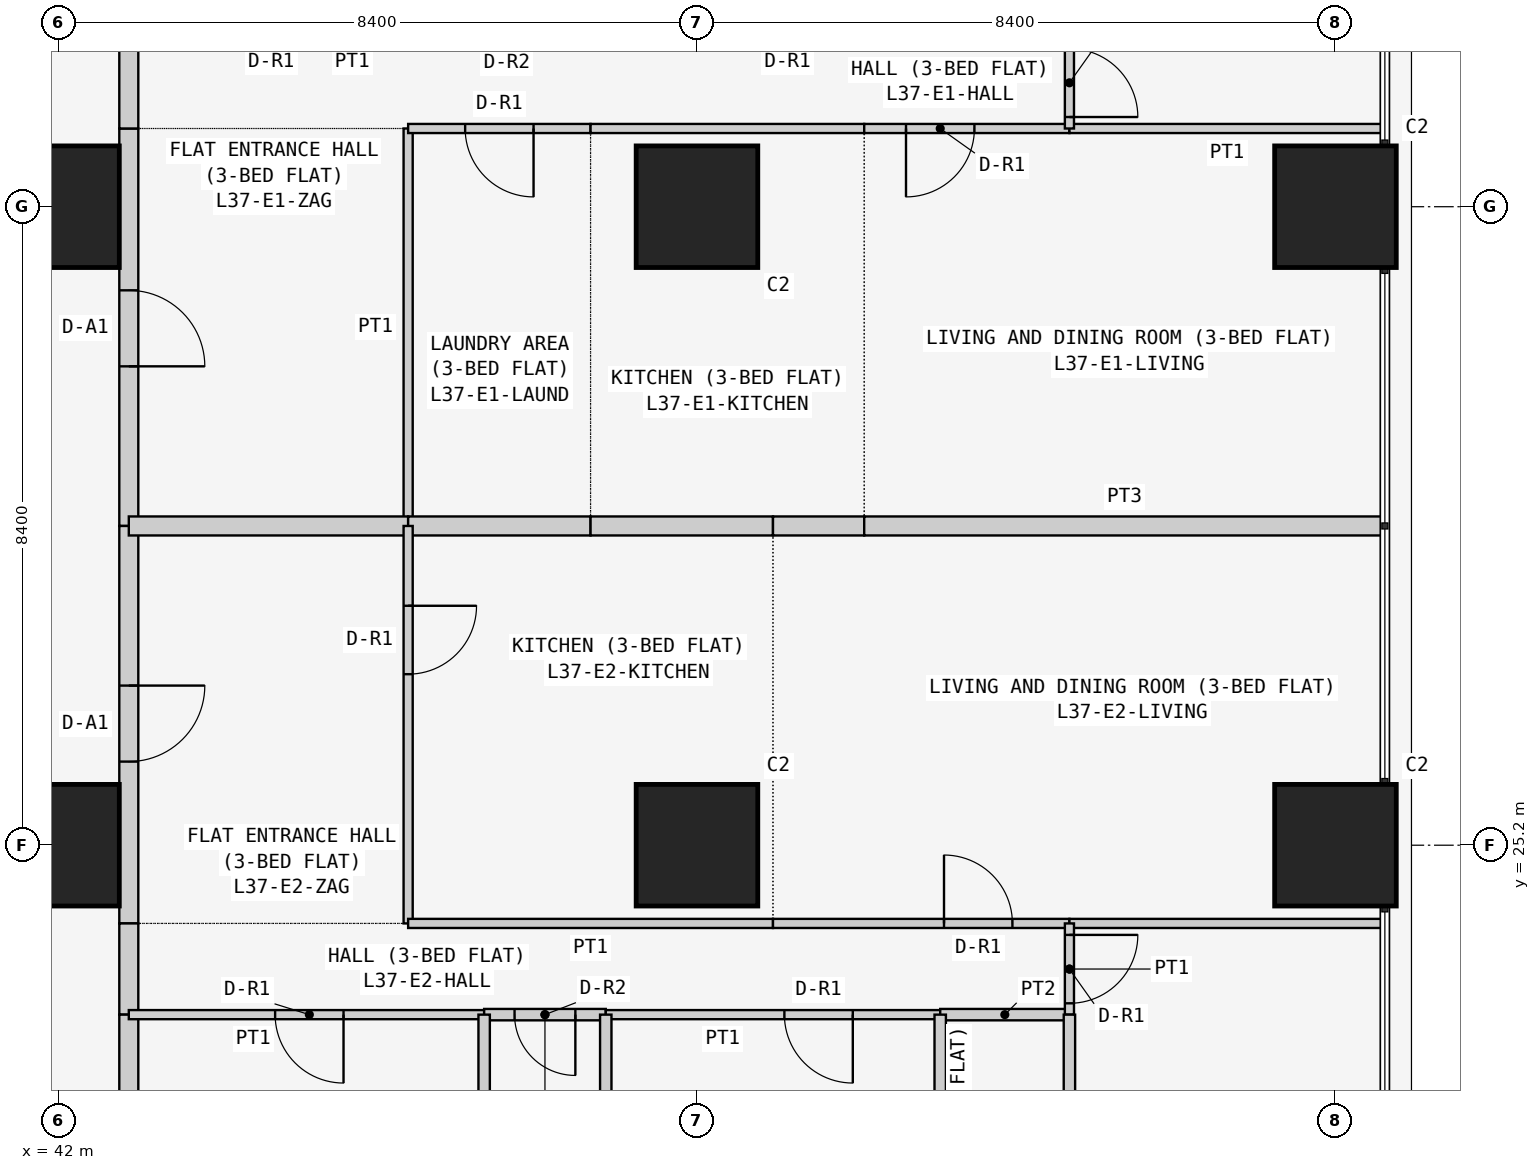
"""IFC4 building model, lengths in metres.
Left out: names, types, materials, properties, quantities, classifications, styles, units other than length and angle.
Written with IfcOpenShell. Run it as: python <this file> out.ifc"""

import sys

from ifc_helpers import new_model, si_unit, direction, frame, frame_2d, origin, origin_2d, place, context, subcontext, project, spatial, rectangle, extrude, element, fill, save


model = new_model("IFC4")
c1 = context("Model", 3, precision=1e-05, world=origin(), true_north=direction((0.0, 1.0)))
c2 = subcontext(c1, "Body", "Model", "MODEL_VIEW")
j1 = project(units=[si_unit("LENGTHUNIT", "METRE"), si_unit("PLANEANGLEUNIT", "RADIAN")], contexts=[c1])
p1 = place(None, origin())
s1 = spatial("IfcSite", under=j1, at=p1, CompositionType="ELEMENT")
p2 = place(p1, origin())
s2 = spatial("IfcBuilding", under=s1, at=p2, CompositionType="ELEMENT")
p3 = place(p2, frame((0.0, 0.0, 144.9)))
s3 = spatial("IfcBuildingStorey", under=s2, at=p3, CompositionType="ELEMENT", Elevation=144.9)
for number, where, z_axis, x_axis in (
    (1, (42.0, 25.2, 0.0), (0.0, 0.0, 1.0), (1.0, 0.0, 0.0)),
    (2, (42.0, 33.6, 0.0), (0.0, 0.0, 1.0), (1.0, 0.0, 0.0)),
    (3, (50.4, 25.2, 0.0), (0.0, 0.0, 1.0), (1.0, 0.0, 0.0)),
    (4, (50.4, 33.6, 0.0), (0.0, 0.0, 1.0), (1.0, 0.0, 0.0)),
    (5, (58.8, 25.2, 0.0), (0.0, 0.0, 1.0), (1.0, 0.0, 0.0)),
    (6, (58.8, 33.6, 0.0), (0.0, 0.0, 1.0), (1.0, 0.0, 0.0)),
):
    element("IfcColumn", number, at=place(p3, frame(where, z_axis=z_axis, x_axis=x_axis)), inside=s3, PredefinedType="COLUMN", context=c2, shape_type="SweptSolid", body=[
        extrude(rectangle(XDim=1.6, YDim=1.6, at=origin_2d()), origin(), (0.0, 0.0, 1.0), 3.6),
    ])
p4 = place(p3, frame((42.925, 34.629, 0.0), z_axis=(0.0, 0.0, 1.0), x_axis=(0.0, -1.0, 0.0)))
e7 = element("IfcWall", 7, at=p4, inside=s3, PredefinedType="PARTITIONING", context=c2, shape_type="SweptSolid", body=[
    extrude(rectangle(XDim=5.229, YDim=0.25, at=frame_2d((2.615, 0.0))), origin(), (0.0, 0.0, 1.0), 3.45),
])
p5 = place(p4, frame((2.129, 0.0, 0.0)))
e8 = element("IfcOpeningElement", 8, at=p5, cuts=e7, PredefinedType="OPENING", context=c2, shape_type="SweptSolid", body=[
    extrude(rectangle(XDim=1.0, YDim=2.1, at=frame_2d((0.5, 1.05))), frame((0.0, 0.135, 0.0), z_axis=(0.0, -1.0, 0.0), x_axis=(1.0, 0.0, 0.0)), (0.0, 0.0, 1.0), 0.27),
])
p6 = place(p3, frame((42.925, 35.829, 0.0), z_axis=(0.0, 0.0, 1.0), x_axis=(0.0, -1.0, 0.0)))
e9 = element("IfcWall", 9, at=p6, inside=s3, PredefinedType="PARTITIONING", context=c2, shape_type="SweptSolid", body=[
    extrude(rectangle(XDim=1.2, YDim=0.25, at=frame_2d((0.6, 0.0))), origin(), (0.0, 0.0, 1.0), 3.45),
])
p7 = place(p3, frame((42.925, 29.4, 0.0), z_axis=(0.0, 0.0, 1.0), x_axis=(0.0, -1.0, 0.0)))
e10 = element("IfcWall", 10, at=p7, inside=s3, PredefinedType="PARTITIONING", context=c2, shape_type="SweptSolid", body=[
    extrude(rectangle(XDim=5.229, YDim=0.25, at=frame_2d((2.615, 0.0))), origin(), (0.0, 0.0, 1.0), 3.45),
])
p8 = place(p7, frame((2.1, 0.0, 0.0)))
e11 = element("IfcOpeningElement", 11, at=p8, cuts=e10, PredefinedType="OPENING", context=c2, shape_type="SweptSolid", body=[
    extrude(rectangle(XDim=1.0, YDim=2.1, at=frame_2d((0.5, 1.05))), frame((0.0, 0.135, 0.0), z_axis=(0.0, -1.0, 0.0), x_axis=(1.0, 0.0, 0.0)), (0.0, 0.0, 1.0), 0.27),
])
p9 = place(p3, frame((42.925, 24.171, 0.0), z_axis=(0.0, 0.0, 1.0), x_axis=(0.0, -1.0, 0.0)))
e12 = element("IfcWall", 12, at=p9, inside=s3, PredefinedType="PARTITIONING", context=c2, shape_type="SweptSolid", body=[
    extrude(rectangle(XDim=1.2, YDim=0.25, at=frame_2d((0.6, 0.0))), origin(), (0.0, 0.0, 1.0), 3.45),
])
p10 = place(p3, frame((42.925, 22.971, 0.0), z_axis=(0.0, 0.0, 1.0), x_axis=(0.0, -1.0, 0.0)))
e13 = element("IfcWall", 13, at=p10, inside=s3, PredefinedType="PARTITIONING", context=c2, shape_type="SweptSolid", body=[
    extrude(rectangle(XDim=6.871, YDim=0.25, at=frame_2d((3.436, 0.0))), origin(), (0.0, 0.0, 1.0), 3.45),
])
p11 = place(p3, frame((46.6, 29.4, 0.0), z_axis=(0.0, 0.0, 1.0), x_axis=(0.0, 1.0, 0.0)))
e14 = element("IfcWall", 14, at=p11, inside=s3, PredefinedType="PARTITIONING", context=c2, shape_type="SweptSolid", body=[
    extrude(rectangle(XDim=5.229, YDim=0.12, at=frame_2d((2.615, 0.0))), origin(), (0.0, 0.0, 1.0), 3.45),
])
p12 = place(p3, frame((42.925, 29.4, 0.0), z_axis=(0.0, 0.0, 1.0), x_axis=(1.0, 0.0, 0.0)))
e15 = element("IfcWall", 15, at=p12, inside=s3, PredefinedType="PARTITIONING", context=c2, shape_type="SweptSolid", body=[
    extrude(rectangle(XDim=3.675, YDim=0.25, at=frame_2d((1.837, 0.0))), origin(), (0.0, 0.0, 1.0), 3.45),
])
p13 = place(p3, frame((49.0, 34.629, 0.0), z_axis=(0.0, 0.0, 1.0), x_axis=(-1.0, 0.0, 0.0)))
e16 = element("IfcWall", 16, at=p13, inside=s3, PredefinedType="PARTITIONING", context=c2, shape_type="SweptSolid", body=[
    extrude(rectangle(XDim=2.4, YDim=0.12, at=frame_2d((1.2, 0.0))), origin(), (0.0, 0.0, 1.0), 3.45),
])
p14 = place(p13, frame((0.75, 0.0, 0.0)))
e17 = element("IfcOpeningElement", 17, at=p14, cuts=e16, PredefinedType="OPENING", context=c2, shape_type="SweptSolid", body=[
    extrude(rectangle(XDim=0.9, YDim=2.1, at=frame_2d((0.45, 1.05))), frame((0.0, 0.07, 0.0), z_axis=(0.0, -1.0, 0.0), x_axis=(1.0, 0.0, 0.0)), (0.0, 0.0, 1.0), 0.14),
])
p15 = place(p3, frame((46.6, 29.4, 0.0), z_axis=(0.0, 0.0, 1.0), x_axis=(1.0, 0.0, 0.0)))
e18 = element("IfcWall", 18, at=p15, inside=s3, PredefinedType="PARTITIONING", context=c2, shape_type="SweptSolid", body=[
    extrude(rectangle(XDim=2.4, YDim=0.25, at=frame_2d((1.2, 0.0))), origin(), (0.0, 0.0, 1.0), 3.45),
])
p16 = place(p3, frame((52.6, 34.629, 0.0), z_axis=(0.0, 0.0, 1.0), x_axis=(-1.0, 0.0, 0.0)))
e19 = element("IfcWall", 19, at=p16, inside=s3, PredefinedType="PARTITIONING", context=c2, shape_type="SweptSolid", body=[
    extrude(rectangle(XDim=3.6, YDim=0.12, at=frame_2d((1.8, 0.0))), origin(), (0.0, 0.0, 1.0), 3.45),
])
p17 = place(p3, frame((49.0, 29.4, 0.0), z_axis=(0.0, 0.0, 1.0), x_axis=(1.0, 0.0, 0.0)))
e20 = element("IfcWall", 20, at=p17, inside=s3, PredefinedType="PARTITIONING", context=c2, shape_type="SweptSolid", body=[
    extrude(rectangle(XDim=2.4, YDim=0.25, at=frame_2d((1.2, 0.0))), origin(), (0.0, 0.0, 1.0), 3.45),
])
p18 = place(p3, frame((51.4, 29.4, 0.0), z_axis=(0.0, 0.0, 1.0), x_axis=(1.0, 0.0, 0.0)))
e21 = element("IfcWall", 21, at=p18, inside=s3, PredefinedType="PARTITIONING", context=c2, shape_type="SweptSolid", body=[
    extrude(rectangle(XDim=1.2, YDim=0.25, at=frame_2d((0.6, 0.0))), origin(), (0.0, 0.0, 1.0), 3.45),
])
p19 = place(p3, frame((55.3, 34.629, 0.0), z_axis=(0.0, 0.0, 1.0), x_axis=(-1.0, 0.0, 0.0)))
e22 = element("IfcWall", 22, at=p19, inside=s3, PredefinedType="PARTITIONING", context=c2, shape_type="SweptSolid", body=[
    extrude(rectangle(XDim=2.7, YDim=0.12, at=frame_2d((1.35, 0.0))), origin(), (0.0, 0.0, 1.0), 3.45),
])
p20 = place(p19, frame((1.25, 0.0, 0.0)))
e23 = element("IfcOpeningElement", 23, at=p20, cuts=e22, PredefinedType="OPENING", context=c2, shape_type="SweptSolid", body=[
    extrude(rectangle(XDim=0.9, YDim=2.1, at=frame_2d((0.45, 1.05))), frame((0.0, 0.07, 0.0), z_axis=(0.0, -1.0, 0.0), x_axis=(1.0, 0.0, 0.0)), (0.0, 0.0, 1.0), 0.14),
])
p21 = place(p3, frame((59.45, 34.629, 0.0), z_axis=(0.0, 0.0, 1.0), x_axis=(-1.0, 0.0, 0.0)))
e24 = element("IfcWall", 24, at=p21, inside=s3, PredefinedType="PARTITIONING", context=c2, shape_type="SweptSolid", body=[
    extrude(rectangle(XDim=4.15, YDim=0.12, at=frame_2d((2.075, 0.0))), origin(), (0.0, 0.0, 1.0), 3.45),
])
p22 = place(p3, frame((52.6, 29.4, 0.0), z_axis=(0.0, 0.0, 1.0), x_axis=(1.0, 0.0, 0.0)))
e25 = element("IfcWall", 25, at=p22, inside=s3, PredefinedType="PARTITIONING", context=c2, shape_type="SweptSolid", body=[
    extrude(rectangle(XDim=6.85, YDim=0.25, at=frame_2d((3.425, 0.0))), origin(), (0.0, 0.0, 1.0), 3.45),
])
p23 = place(p3, frame((55.3, 34.629, 0.0), z_axis=(0.0, 0.0, 1.0), x_axis=(0.0, 1.0, 0.0)))
e26 = element("IfcWall", 26, at=p23, inside=s3, PredefinedType="PARTITIONING", context=c2, shape_type="SweptSolid", body=[
    extrude(rectangle(XDim=1.2, YDim=0.12, at=frame_2d((0.6, 0.0))), origin(), (0.0, 0.0, 1.0), 3.45),
])
p24 = place(p23, frame((0.151, 0.0, 0.0)))
e27 = element("IfcOpeningElement", 27, at=p24, cuts=e26, PredefinedType="OPENING", context=c2, shape_type="SweptSolid", body=[
    extrude(rectangle(XDim=0.9, YDim=2.1, at=frame_2d((0.45, 1.05))), frame((0.0, 0.07, 0.0), z_axis=(0.0, -1.0, 0.0), x_axis=(1.0, 0.0, 0.0)), (0.0, 0.0, 1.0), 0.14),
])
p25 = place(p3, frame((46.6, 29.4, 0.0), z_axis=(0.0, 0.0, 1.0), x_axis=(0.0, -1.0, 0.0)))
e28 = element("IfcWall", 28, at=p25, inside=s3, PredefinedType="PARTITIONING", context=c2, shape_type="SweptSolid", body=[
    extrude(rectangle(XDim=5.229, YDim=0.12, at=frame_2d((2.615, 0.0))), origin(), (0.0, 0.0, 1.0), 3.45),
])
p26 = place(p25, frame((1.05, 0.0, 0.0)))
e29 = element("IfcOpeningElement", 29, at=p26, cuts=e28, PredefinedType="OPENING", context=c2, shape_type="SweptSolid", body=[
    extrude(rectangle(XDim=0.9, YDim=2.1, at=frame_2d((0.45, 1.05))), frame((0.0, 0.07, 0.0), z_axis=(0.0, -1.0, 0.0), x_axis=(1.0, 0.0, 0.0)), (0.0, 0.0, 1.0), 0.14),
])
p27 = place(p3, frame((51.4, 24.171, 0.0), z_axis=(0.0, 0.0, 1.0), x_axis=(-1.0, 0.0, 0.0)))
e30 = element("IfcWall", 30, at=p27, inside=s3, PredefinedType="PARTITIONING", context=c2, shape_type="SweptSolid", body=[
    extrude(rectangle(XDim=4.8, YDim=0.12, at=frame_2d((2.4, 0.0))), origin(), (0.0, 0.0, 1.0), 3.45),
])
p28 = place(p3, frame((55.3, 24.171, 0.0), z_axis=(0.0, 0.0, 1.0), x_axis=(-1.0, 0.0, 0.0)))
e31 = element("IfcWall", 31, at=p28, inside=s3, PredefinedType="PARTITIONING", context=c2, shape_type="SweptSolid", body=[
    extrude(rectangle(XDim=3.9, YDim=0.12, at=frame_2d((1.95, 0.0))), origin(), (0.0, 0.0, 1.0), 3.45),
])
p29 = place(p28, frame((0.75, 0.0, 0.0)))
e32 = element("IfcOpeningElement", 32, at=p29, cuts=e31, PredefinedType="OPENING", context=c2, shape_type="SweptSolid", body=[
    extrude(rectangle(XDim=0.9, YDim=2.1, at=frame_2d((0.45, 1.05))), frame((0.0, 0.07, 0.0), z_axis=(0.0, -1.0, 0.0), x_axis=(1.0, 0.0, 0.0)), (0.0, 0.0, 1.0), 0.14),
])
p30 = place(p3, frame((59.45, 24.171, 0.0), z_axis=(0.0, 0.0, 1.0), x_axis=(-1.0, 0.0, 0.0)))
e33 = element("IfcWall", 33, at=p30, inside=s3, PredefinedType="PARTITIONING", context=c2, shape_type="SweptSolid", body=[
    extrude(rectangle(XDim=4.15, YDim=0.12, at=frame_2d((2.075, 0.0))), origin(), (0.0, 0.0, 1.0), 3.45),
])
p31 = place(p3, frame((47.6, 22.971, 0.0), z_axis=(0.0, 0.0, 1.0), x_axis=(-1.0, 0.0, 0.0)))
e34 = element("IfcWall", 34, at=p31, inside=s3, PredefinedType="PARTITIONING", context=c2, shape_type="SweptSolid", body=[
    extrude(rectangle(XDim=4.675, YDim=0.12, at=frame_2d((2.337, 0.0))), origin(), (0.0, 0.0, 1.0), 3.45),
])
p32 = place(p31, frame((1.85, 0.0, 0.0)))
e35 = element("IfcOpeningElement", 35, at=p32, cuts=e34, PredefinedType="OPENING", context=c2, shape_type="SweptSolid", body=[
    extrude(rectangle(XDim=0.9, YDim=2.1, at=frame_2d((0.45, 1.05))), frame((0.0, 0.07, 0.0), z_axis=(0.0, -1.0, 0.0), x_axis=(1.0, 0.0, 0.0)), (0.0, 0.0, 1.0), 0.14),
])
p33 = place(p3, frame((49.2, 22.971, 0.0), z_axis=(0.0, 0.0, 1.0), x_axis=(-1.0, 0.0, 0.0)))
e36 = element("IfcWall", 36, at=p33, inside=s3, PredefinedType="PARTITIONING", context=c2, shape_type="SweptSolid", body=[
    extrude(rectangle(XDim=1.6, YDim=0.15, at=frame_2d((0.8, 0.0))), origin(), (0.0, 0.0, 1.0), 3.45),
])
p34 = place(p33, frame((0.4, 0.0, 0.0)))
e37 = element("IfcOpeningElement", 37, at=p34, cuts=e36, PredefinedType="OPENING", context=c2, shape_type="SweptSolid", body=[
    extrude(rectangle(XDim=0.8, YDim=2.1, at=frame_2d((0.4, 1.05))), frame((0.0, 0.085, 0.0), z_axis=(0.0, -1.0, 0.0), x_axis=(1.0, 0.0, 0.0)), (0.0, 0.0, 1.0), 0.17),
])
p35 = place(p3, frame((53.6, 22.971, 0.0), z_axis=(0.0, 0.0, 1.0), x_axis=(-1.0, 0.0, 0.0)))
e38 = element("IfcWall", 38, at=p35, inside=s3, PredefinedType="PARTITIONING", context=c2, shape_type="SweptSolid", body=[
    extrude(rectangle(XDim=4.4, YDim=0.12, at=frame_2d((2.2, 0.0))), origin(), (0.0, 0.0, 1.0), 3.45),
])
p36 = place(p35, frame((1.15, 0.0, 0.0)))
e39 = element("IfcOpeningElement", 39, at=p36, cuts=e38, PredefinedType="OPENING", context=c2, shape_type="SweptSolid", body=[
    extrude(rectangle(XDim=0.9, YDim=2.1, at=frame_2d((0.45, 1.05))), frame((0.0, 0.07, 0.0), z_axis=(0.0, -1.0, 0.0), x_axis=(1.0, 0.0, 0.0)), (0.0, 0.0, 1.0), 0.14),
])
p37 = place(p3, frame((55.3, 22.971, 0.0), z_axis=(0.0, 0.0, 1.0), x_axis=(-1.0, 0.0, 0.0)))
e40 = element("IfcWall", 40, at=p37, inside=s3, PredefinedType="PARTITIONING", context=c2, shape_type="SweptSolid", body=[
    extrude(rectangle(XDim=1.7, YDim=0.15, at=frame_2d((0.85, 0.0))), origin(), (0.0, 0.0, 1.0), 3.45),
])
p38 = place(p3, frame((55.3, 24.171, 0.0), z_axis=(0.0, 0.0, 1.0), x_axis=(0.0, -1.0, 0.0)))
e41 = element("IfcWall", 41, at=p38, inside=s3, PredefinedType="PARTITIONING", context=c2, shape_type="SweptSolid", body=[
    extrude(rectangle(XDim=1.2, YDim=0.12, at=frame_2d((0.6, 0.0))), origin(), (0.0, 0.0, 1.0), 3.45),
])
p39 = place(p38, frame((0.151, 0.0, 0.0)))
e42 = element("IfcOpeningElement", 42, at=p39, cuts=e41, PredefinedType="OPENING", context=c2, shape_type="SweptSolid", body=[
    extrude(rectangle(XDim=0.9, YDim=2.1, at=frame_2d((0.45, 1.05))), frame((0.0, 0.07, 0.0), z_axis=(0.0, -1.0, 0.0), x_axis=(1.0, 0.0, 0.0)), (0.0, 0.0, 1.0), 0.14),
])
for number, where, z_axis, x_axis in (
    (43, (47.6, 22.971, 0.0), (0.0, 0.0, 1.0), (0.0, -1.0, 0.0)),
    (44, (49.2, 22.971, 0.0), (0.0, 0.0, 1.0), (0.0, -1.0, 0.0)),
    (45, (53.6, 22.971, 0.0), (0.0, 0.0, 1.0), (0.0, -1.0, 0.0)),
):
    element("IfcWall", number, at=place(p3, frame(where, z_axis=z_axis, x_axis=x_axis)), inside=s3, PredefinedType="PARTITIONING", context=c2, shape_type="SweptSolid", body=[
        extrude(rectangle(XDim=6.871, YDim=0.15, at=frame_2d((3.436, 0.0))), origin(), (0.0, 0.0, 1.0), 3.45),
    ])
p40 = place(p3, frame((55.3, 22.971, 0.0), z_axis=(0.0, 0.0, 1.0), x_axis=(0.0, -1.0, 0.0)))
e46 = element("IfcWall", 46, at=p40, inside=s3, PredefinedType="PARTITIONING", context=c2, shape_type="SweptSolid", body=[
    extrude(rectangle(XDim=6.871, YDim=0.15, at=frame_2d((3.436, 0.0))), origin(), (0.0, 0.0, 1.0), 3.45),
])
p41 = place(p40, frame((3.171, 0.0, 0.0)))
e47 = element("IfcOpeningElement", 47, at=p41, cuts=e46, PredefinedType="OPENING", context=c2, shape_type="SweptSolid", body=[
    extrude(rectangle(XDim=0.8, YDim=2.1, at=frame_2d((0.4, 1.05))), frame((0.0, 0.085, 0.0), z_axis=(0.0, -1.0, 0.0), x_axis=(1.0, 0.0, 0.0)), (0.0, 0.0, 1.0), 0.17),
])
p42 = place(p5, origin())
e48 = element("IfcDoor", 48, at=p42, inside=s3, OperationType="SINGLE_SWING_RIGHT", PredefinedType="DOOR", context=c2, shape_type="SweptSolid", body=[
    extrude(rectangle(XDim=1.0, YDim=2.1, at=frame_2d((0.5, 1.05))), frame((0.0, 0.025, 0.0), z_axis=(0.0, -1.0, 0.0), x_axis=(1.0, 0.0, 0.0)), (0.0, 0.0, 1.0), 0.05),
])
fill(e8, e48)
p43 = place(p14, origin())
e49 = element("IfcDoor", 49, at=p43, inside=s3, OperationType="SINGLE_SWING_LEFT", PredefinedType="DOOR", context=c2, shape_type="SweptSolid", body=[
    extrude(rectangle(XDim=0.9, YDim=2.1, at=frame_2d((0.45, 1.05))), frame((0.0, 0.025, 0.0), z_axis=(0.0, -1.0, 0.0), x_axis=(1.0, 0.0, 0.0)), (0.0, 0.0, 1.0), 0.05),
])
fill(e17, e49)
p44 = place(p20, origin())
e50 = element("IfcDoor", 50, at=p44, inside=s3, OperationType="SINGLE_SWING_RIGHT", PredefinedType="DOOR", context=c2, shape_type="SweptSolid", body=[
    extrude(rectangle(XDim=0.9, YDim=2.1, at=frame_2d((0.45, 1.05))), frame((0.0, 0.025, 0.0), z_axis=(0.0, -1.0, 0.0), x_axis=(1.0, 0.0, 0.0)), (0.0, 0.0, 1.0), 0.05),
])
fill(e23, e50)
p45 = place(p24, frame((0.9, 0.0, 0.0), z_axis=(0.0, 0.0, 1.0), x_axis=(-1.0, 0.0, 0.0)))
e51 = element("IfcDoor", 51, at=p45, inside=s3, OperationType="SINGLE_SWING_RIGHT", PredefinedType="DOOR", context=c2, shape_type="SweptSolid", body=[
    extrude(rectangle(XDim=0.9, YDim=2.1, at=frame_2d((0.45, 1.05))), frame((0.0, 0.025, 0.0), z_axis=(0.0, -1.0, 0.0), x_axis=(1.0, 0.0, 0.0)), (0.0, 0.0, 1.0), 0.05),
])
fill(e27, e51)
p46 = place(p8, origin())
e52 = element("IfcDoor", 52, at=p46, inside=s3, OperationType="SINGLE_SWING_LEFT", PredefinedType="DOOR", context=c2, shape_type="SweptSolid", body=[
    extrude(rectangle(XDim=1.0, YDim=2.1, at=frame_2d((0.5, 1.05))), frame((0.0, 0.025, 0.0), z_axis=(0.0, -1.0, 0.0), x_axis=(1.0, 0.0, 0.0)), (0.0, 0.0, 1.0), 0.05),
])
fill(e11, e52)
p47 = place(p26, origin())
e53 = element("IfcDoor", 53, at=p47, inside=s3, OperationType="SINGLE_SWING_LEFT", PredefinedType="DOOR", context=c2, shape_type="SweptSolid", body=[
    extrude(rectangle(XDim=0.9, YDim=2.1, at=frame_2d((0.45, 1.05))), frame((0.0, 0.025, 0.0), z_axis=(0.0, -1.0, 0.0), x_axis=(1.0, 0.0, 0.0)), (0.0, 0.0, 1.0), 0.05),
])
fill(e29, e53)
p48 = place(p29, frame((0.9, 0.0, 0.0), z_axis=(0.0, 0.0, 1.0), x_axis=(-1.0, 0.0, 0.0)))
e54 = element("IfcDoor", 54, at=p48, inside=s3, OperationType="SINGLE_SWING_LEFT", PredefinedType="DOOR", context=c2, shape_type="SweptSolid", body=[
    extrude(rectangle(XDim=0.9, YDim=2.1, at=frame_2d((0.45, 1.05))), frame((0.0, 0.025, 0.0), z_axis=(0.0, -1.0, 0.0), x_axis=(1.0, 0.0, 0.0)), (0.0, 0.0, 1.0), 0.05),
])
fill(e32, e54)
p49 = place(p32, origin())
e55 = element("IfcDoor", 55, at=p49, inside=s3, OperationType="SINGLE_SWING_LEFT", PredefinedType="DOOR", context=c2, shape_type="SweptSolid", body=[
    extrude(rectangle(XDim=0.9, YDim=2.1, at=frame_2d((0.45, 1.05))), frame((0.0, 0.025, 0.0), z_axis=(0.0, -1.0, 0.0), x_axis=(1.0, 0.0, 0.0)), (0.0, 0.0, 1.0), 0.05),
])
fill(e35, e55)
p50 = place(p34, origin())
e56 = element("IfcDoor", 56, at=p50, inside=s3, OperationType="SINGLE_SWING_LEFT", PredefinedType="DOOR", context=c2, shape_type="SweptSolid", body=[
    extrude(rectangle(XDim=0.8, YDim=2.1, at=frame_2d((0.4, 1.05))), frame((0.0, 0.025, 0.0), z_axis=(0.0, -1.0, 0.0), x_axis=(1.0, 0.0, 0.0)), (0.0, 0.0, 1.0), 0.05),
])
fill(e37, e56)
p51 = place(p36, origin())
e57 = element("IfcDoor", 57, at=p51, inside=s3, OperationType="SINGLE_SWING_LEFT", PredefinedType="DOOR", context=c2, shape_type="SweptSolid", body=[
    extrude(rectangle(XDim=0.9, YDim=2.1, at=frame_2d((0.45, 1.05))), frame((0.0, 0.025, 0.0), z_axis=(0.0, -1.0, 0.0), x_axis=(1.0, 0.0, 0.0)), (0.0, 0.0, 1.0), 0.05),
])
fill(e39, e57)
p52 = place(p39, origin())
e58 = element("IfcDoor", 58, at=p52, inside=s3, OperationType="SINGLE_SWING_LEFT", PredefinedType="DOOR", context=c2, shape_type="SweptSolid", body=[
    extrude(rectangle(XDim=0.9, YDim=2.1, at=frame_2d((0.45, 1.05))), frame((0.0, 0.025, 0.0), z_axis=(0.0, -1.0, 0.0), x_axis=(1.0, 0.0, 0.0)), (0.0, 0.0, 1.0), 0.05),
])
fill(e42, e58)
save(model, sys.argv[1])
